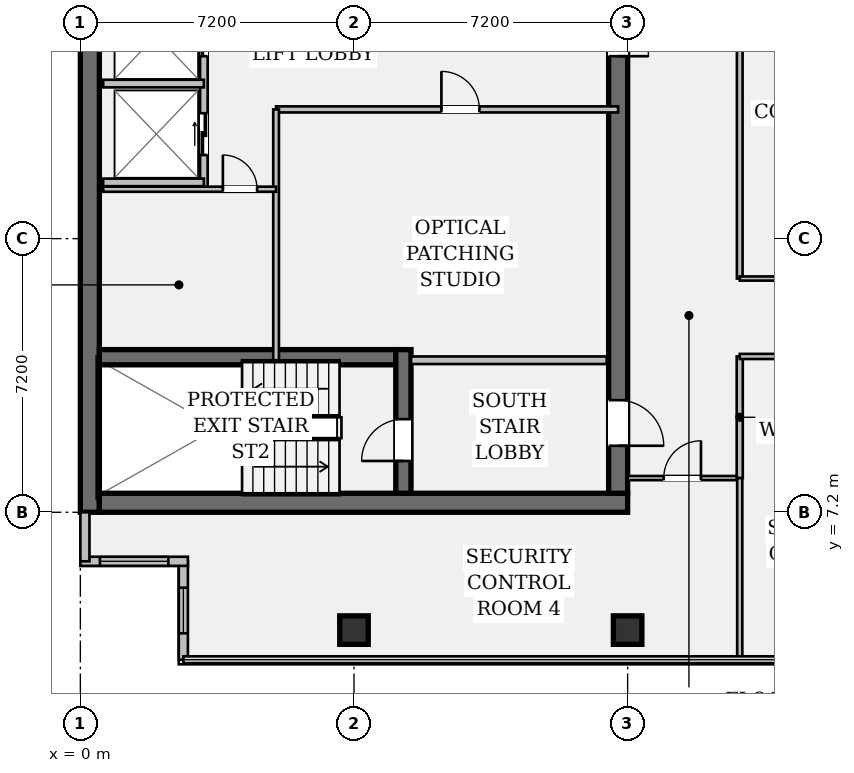
"""IFC4 building model, lengths in metres.
Left out: names, types, materials, properties, quantities, classifications, styles, units other than length and angle.
Written with IfcOpenShell. Run it as: python <this file> out.ifc"""

import sys

from ifc_helpers import new_model, si_unit, direction, frame, frame_2d, origin, origin_2d, place, context, subcontext, project, spatial, rectangle, hollow_rectangle, extrude, element, fill, save


model = new_model("IFC4")
c1 = context("Model", 3, precision=1e-05, world=origin(), true_north=direction((0.0, 1.0)))
c2 = subcontext(c1, "Body", "Model", "MODEL_VIEW")
j1 = project(units=[si_unit("LENGTHUNIT", "METRE"), si_unit("PLANEANGLEUNIT", "RADIAN")], contexts=[c1])
p1 = place(None, origin())
s1 = spatial("IfcSite", under=j1, at=p1, CompositionType="ELEMENT")
p2 = place(p1, origin())
s2 = spatial("IfcBuilding", under=s1, at=p2, CompositionType="ELEMENT")
p3 = place(p2, frame((0.0, 0.0, 204.75)))
s3 = spatial("IfcBuildingStorey", under=s2, at=p3, CompositionType="ELEMENT", Elevation=204.75)
p4 = place(p3, frame((0.25, 7.2, 0.0), z_axis=(0.0, 0.0, 1.0), x_axis=(0.0, 1.0, 0.0)))
e1 = element("IfcWall", 1, at=p4, inside=s3, PredefinedType="SHEAR", context=c2, shape_type="SweptSolid", body=[
    extrude(rectangle(XDim=28.8, YDim=0.5, at=frame_2d((14.4, 0.0))), origin(), (0.0, 0.0, 1.0), 3.24),
])
p5 = place(p3, frame((0.5, 7.45, 0.0), z_axis=(0.0, 0.0, 1.0), x_axis=(1.0, 0.0, 0.0)))
e2 = element("IfcWall", 2, at=p5, inside=s3, PredefinedType="SHEAR", context=c2, shape_type="SweptSolid", body=[
    extrude(rectangle(XDim=13.9, YDim=0.5, at=frame_2d((6.95, 0.0))), origin(), (0.0, 0.0, 1.0), 3.24),
])
p6 = place(p3, frame((14.15, 35.5, 0.0), z_axis=(0.0, 0.0, 1.0), x_axis=(0.0, -1.0, 0.0)))
e3 = element("IfcWall", 3, at=p6, inside=s3, PredefinedType="SHEAR", context=c2, shape_type="SweptSolid", body=[
    extrude(rectangle(XDim=27.8, YDim=0.5, at=frame_2d((13.9, 0.0))), origin(), (0.0, 0.0, 1.0), 3.24),
])
p7 = place(p6, frame((1.4, 0.0, 0.0)))
e4 = element("IfcOpeningElement", 4, at=p7, cuts=e3, PredefinedType="OPENING", context=c2, shape_type="SweptSolid", body=[
    extrude(rectangle(XDim=1.2, YDim=2.15, at=frame_2d((0.6, 1.075))), frame((0.0, 0.262, 0.0), z_axis=(0.0, -1.0, 0.0), x_axis=(1.0, 0.0, 0.0)), (0.0, 0.0, 1.0), 0.524),
])
p8 = place(p6, frame((25.35, 0.0, 0.0)))
e5 = element("IfcOpeningElement", 5, at=p8, cuts=e3, PredefinedType="OPENING", context=c2, shape_type="SweptSolid", body=[
    extrude(rectangle(XDim=1.2, YDim=2.15, at=frame_2d((0.6, 1.075))), frame((0.0, 0.262, 0.0), z_axis=(0.0, -1.0, 0.0), x_axis=(1.0, 0.0, 0.0)), (0.0, 0.0, 1.0), 0.524),
])
p9 = place(p6, frame((14.7, 0.0, 0.0)))
e6 = element("IfcOpeningElement", 6, at=p9, cuts=e3, PredefinedType="OPENING", context=c2, shape_type="SweptSolid", body=[
    extrude(rectangle(XDim=1.6, YDim=2.2, at=frame_2d((0.8, 1.1))), frame((0.0, 0.262, 0.0), z_axis=(0.0, -1.0, 0.0), x_axis=(1.0, 0.0, 0.0)), (0.0, 0.0, 1.0), 0.524),
])
p10 = place(p3, frame((0.5, 11.28, 0.0), z_axis=(0.0, 0.0, 1.0), x_axis=(1.0, 0.0, 0.0)))
e7 = element("IfcWall", 7, at=p10, inside=s3, PredefinedType="SHEAR", context=c2, shape_type="SweptSolid", body=[
    extrude(rectangle(XDim=7.8, YDim=0.4, at=frame_2d((3.9, 0.0))), origin(), (0.0, 0.0, 1.0), 3.24),
])
p11 = place(p3, frame((8.5, 7.7, 0.0), z_axis=(0.0, 0.0, 1.0), x_axis=(0.0, 1.0, 0.0)))
e8 = element("IfcWall", 8, at=p11, inside=s3, PredefinedType="SHEAR", context=c2, shape_type="SweptSolid", body=[
    extrude(rectangle(XDim=3.78, YDim=0.4, at=frame_2d((1.89, 0.0))), origin(), (0.0, 0.0, 1.0), 3.24),
])
p12 = place(p11, frame((0.85, 0.0, 0.0)))
e9 = element("IfcOpeningElement", 9, at=p12, cuts=e8, PredefinedType="OPENING", context=c2, shape_type="SweptSolid", body=[
    extrude(rectangle(XDim=1.1, YDim=2.15, at=frame_2d((0.55, 1.075))), frame((0.0, 0.212, 0.0), z_axis=(0.0, -1.0, 0.0), x_axis=(1.0, 0.0, 0.0)), (0.0, 0.0, 1.0), 0.424),
])
for number, where, z_axis, x_axis in (
    (10, (7.2, 4.1, 0.0), (0.0, 0.0, 1.0), (1.0, 0.0, 0.0)),
    (11, (14.4, 4.1, 0.0), (0.0, 0.0, 1.0), (1.0, 0.0, 0.0)),
):
    element("IfcColumn", number, at=place(p3, frame(where, z_axis=z_axis, x_axis=x_axis)), inside=s3, PredefinedType="COLUMN", context=c2, shape_type="SweptSolid", body=[
        extrude(hollow_rectangle(XDim=0.75, YDim=0.75, WallThickness=0.045, at=origin_2d()), origin(), (0.0, 0.0, 1.0), 3.24),
    ])
p13 = place(p3, frame((2.71, 3.32, 0.0), z_axis=(0.0, 0.0, 1.0), x_axis=(0.0, 1.0, 0.0)))
e12 = element("IfcWall", 12, at=p13, inside=s3, PredefinedType="STANDARD", context=c2, shape_type="SweptSolid", body=[
    extrude(rectangle(XDim=2.59, YDim=0.24, at=frame_2d((1.295, 0.0))), origin(), (0.0, 0.0, 1.0), 3.24),
])
p14 = place(p13, frame((0.695, 0.0, 0.95)))
e13 = element("IfcOpeningElement", 13, at=p14, cuts=e12, PredefinedType="OPENING", context=c2, shape_type="SweptSolid", body=[
    extrude(rectangle(XDim=1.2, YDim=1.8, at=frame_2d((0.6, 0.9))), frame((0.0, 0.132, 0.0), z_axis=(0.0, -1.0, 0.0), x_axis=(1.0, 0.0, 0.0)), (0.0, 0.0, 1.0), 0.264),
])
p15 = place(p3, frame((2.83, 5.91, 0.0), z_axis=(0.0, 0.0, 1.0), x_axis=(-1.0, 0.0, 0.0)))
e14 = element("IfcWall", 14, at=p15, inside=s3, PredefinedType="STANDARD", context=c2, shape_type="SweptSolid", body=[
    extrude(rectangle(XDim=2.83, YDim=0.24, at=frame_2d((1.415, 0.0))), origin(), (0.0, 0.0, 1.0), 3.24),
])
p16 = place(p15, frame((0.515, 0.0, 0.95)))
e15 = element("IfcOpeningElement", 15, at=p16, cuts=e14, PredefinedType="OPENING", context=c2, shape_type="SweptSolid", body=[
    extrude(rectangle(XDim=1.8, YDim=1.35, at=frame_2d((0.9, 0.675))), frame((0.0, 0.132, 0.0), z_axis=(0.0, -1.0, 0.0), x_axis=(1.0, 0.0, 0.0)), (0.0, 0.0, 1.0), 0.264),
])
p17 = place(p3, frame((0.12, 5.91, 0.0), z_axis=(0.0, 0.0, 1.0), x_axis=(0.0, 1.0, 0.0)))
e16 = element("IfcWall", 16, at=p17, inside=s3, PredefinedType="STANDARD", context=c2, shape_type="SweptSolid", body=[
    extrude(rectangle(XDim=1.29, YDim=0.24, at=frame_2d((0.645, 0.0))), origin(), (0.0, 0.0, 1.0), 3.24),
])
p18 = place(p3, frame((8.7, 11.2, 0.0), z_axis=(0.0, 0.0, 1.0), x_axis=(1.0, 0.0, 0.0)))
e17 = element("IfcWall", 17, at=p18, inside=s3, PredefinedType="PARTITIONING", context=c2, shape_type="SweptSolid", body=[
    extrude(rectangle(XDim=5.15, YDim=0.2, at=frame_2d((2.575, 0.0))), origin(), (0.0, 0.0, 1.0), 3.24),
])
p19 = place(p3, frame((3.25, 15.7, 0.0), z_axis=(0.0, 0.0, 1.0), x_axis=(0.0, 1.0, 0.0)))
e18 = element("IfcWall", 18, at=p19, inside=s3, PredefinedType="PARTITIONING", context=c2, shape_type="SweptSolid", body=[
    extrude(rectangle(XDim=13.08, YDim=0.2, at=frame_2d((6.54, 0.0))), origin(), (0.0, 0.0, 1.0), 3.24),
])
p20 = place(p19, frame((0.9, 0.0, 0.0)))
e19 = element("IfcOpeningElement", 19, at=p20, cuts=e18, PredefinedType="OPENING", context=c2, shape_type="SweptSolid", body=[
    extrude(rectangle(XDim=1.1, YDim=2.2, at=frame_2d((0.55, 1.1))), frame((0.0, 0.112, 0.0), z_axis=(0.0, -1.0, 0.0), x_axis=(1.0, 0.0, 0.0)), (0.0, 0.0, 1.0), 0.224),
])
p21 = place(p19, frame((3.5, 0.0, 0.0)))
e20 = element("IfcOpeningElement", 20, at=p21, cuts=e18, PredefinedType="OPENING", context=c2, shape_type="SweptSolid", body=[
    extrude(rectangle(XDim=1.1, YDim=2.2, at=frame_2d((0.55, 1.1))), frame((0.0, 0.112, 0.0), z_axis=(0.0, -1.0, 0.0), x_axis=(1.0, 0.0, 0.0)), (0.0, 0.0, 1.0), 0.224),
])
p22 = place(p19, frame((7.2, 0.0, 0.0)))
e21 = element("IfcOpeningElement", 21, at=p22, cuts=e18, PredefinedType="OPENING", context=c2, shape_type="SweptSolid", body=[
    extrude(rectangle(XDim=1.1, YDim=2.2, at=frame_2d((0.55, 1.1))), frame((0.0, 0.112, 0.0), z_axis=(0.0, -1.0, 0.0), x_axis=(1.0, 0.0, 0.0)), (0.0, 0.0, 1.0), 0.224),
])
p23 = place(p19, frame((9.8, 0.0, 0.0)))
e22 = element("IfcOpeningElement", 22, at=p23, cuts=e18, PredefinedType="OPENING", context=c2, shape_type="SweptSolid", body=[
    extrude(rectangle(XDim=1.1, YDim=2.2, at=frame_2d((0.55, 1.1))), frame((0.0, 0.112, 0.0), z_axis=(0.0, -1.0, 0.0), x_axis=(1.0, 0.0, 0.0)), (0.0, 0.0, 1.0), 0.224),
])
for number, where, z_axis, x_axis in (
    (23, (0.6, 15.88, 0.0), (0.0, 0.0, 1.0), (1.0, 0.0, 0.0)),
    (24, (0.6, 18.48, 0.0), (0.0, 0.0, 1.0), (1.0, 0.0, 0.0)),
):
    element("IfcWall", number, at=place(p3, frame(where, z_axis=z_axis, x_axis=x_axis)), inside=s3, PredefinedType="PARTITIONING", context=c2, shape_type="SweptSolid", body=[
        extrude(rectangle(XDim=2.65, YDim=0.2, at=frame_2d((1.325, 0.0))), origin(), (0.0, 0.0, 1.0), 3.24),
    ])
p24 = place(p3, frame((5.15, 17.8, 0.0), z_axis=(0.0, 0.0, 1.0), x_axis=(1.0, 0.0, 0.0)))
e25 = element("IfcWall", 25, at=p24, inside=s3, PredefinedType="PARTITIONING", context=c2, shape_type="SweptSolid", body=[
    extrude(rectangle(XDim=9.0, YDim=0.16, at=frame_2d((4.5, 0.0))), origin(), (0.0, 0.0, 1.0), 3.24),
])
p25 = place(p24, frame((4.35, 0.0, 0.0)))
e26 = element("IfcOpeningElement", 26, at=p25, cuts=e25, PredefinedType="OPENING", context=c2, shape_type="SweptSolid", body=[
    extrude(rectangle(XDim=1.0, YDim=2.15, at=frame_2d((0.5, 1.075))), frame((0.0, 0.092, 0.0), z_axis=(0.0, -1.0, 0.0), x_axis=(1.0, 0.0, 0.0)), (0.0, 0.0, 1.0), 0.184),
])
p26 = place(p3, frame((5.15, 11.2, 0.0), z_axis=(0.0, 0.0, 1.0), x_axis=(0.0, 1.0, 0.0)))
e27 = element("IfcWall", 27, at=p26, inside=s3, PredefinedType="PARTITIONING", context=c2, shape_type="SweptSolid", body=[
    extrude(rectangle(XDim=6.6, YDim=0.15, at=frame_2d((3.3, 0.0))), origin(), (0.0, 0.0, 1.0), 3.24),
])
p27 = place(p3, frame((0.6, 15.7, 0.0), z_axis=(0.0, 0.0, 1.0), x_axis=(1.0, 0.0, 0.0)))
e28 = element("IfcWall", 28, at=p27, inside=s3, PredefinedType="PARTITIONING", context=c2, shape_type="SweptSolid", body=[
    extrude(rectangle(XDim=4.55, YDim=0.135, at=frame_2d((2.275, 0.0))), origin(), (0.0, 0.0, 1.0), 3.24),
])
p28 = place(p27, frame((3.15, 0.0, 0.0)))
e29 = element("IfcOpeningElement", 29, at=p28, cuts=e28, PredefinedType="OPENING", context=c2, shape_type="SweptSolid", body=[
    extrude(rectangle(XDim=0.9, YDim=2.15, at=frame_2d((0.45, 1.075))), frame((0.0, 0.08, 0.0), z_axis=(0.0, -1.0, 0.0), x_axis=(1.0, 0.0, 0.0)), (0.0, 0.0, 1.0), 0.159),
])
p29 = place(p3, frame((14.4, 8.1, 0.0), z_axis=(0.0, 0.0, 1.0), x_axis=(1.0, 0.0, 0.0)))
e30 = element("IfcWall", 30, at=p29, inside=s3, PredefinedType="PARTITIONING", context=c2, shape_type="SweptSolid", body=[
    extrude(rectangle(XDim=2.95, YDim=0.11, at=frame_2d((1.475, 0.0))), origin(), (0.0, 0.0, 1.0), 2.808),
])
p30 = place(p29, frame((0.95, 0.0, 0.0)))
e31 = element("IfcOpeningElement", 31, at=p30, cuts=e30, PredefinedType="OPENING", context=c2, shape_type="SweptSolid", body=[
    extrude(rectangle(XDim=0.98, YDim=2.15, at=frame_2d((0.49, 1.075))), frame((0.0, 0.067, 0.0), z_axis=(0.0, -1.0, 0.0), x_axis=(1.0, 0.0, 0.0)), (0.0, 0.0, 1.0), 0.134),
])
p31 = place(p3, frame((17.35, 8.1, 0.0), z_axis=(0.0, 0.0, 1.0), x_axis=(0.0, 1.0, 0.0)))
e32 = element("IfcWall", 32, at=p31, inside=s3, PredefinedType="PARTITIONING", context=c2, shape_type="SweptSolid", body=[
    extrude(rectangle(XDim=3.2, YDim=0.16, at=frame_2d((1.6, 0.0))), origin(), (0.0, 0.0, 1.0), 3.24),
])
p32 = place(p3, frame((17.35, 13.35, 0.0), z_axis=(0.0, 0.0, 1.0), x_axis=(0.0, 1.0, 0.0)))
e33 = element("IfcWall", 33, at=p32, inside=s3, PredefinedType="PARTITIONING", context=c2, shape_type="SweptSolid", body=[
    extrude(rectangle(XDim=22.55, YDim=0.15, at=frame_2d((11.275, 0.0))), origin(), (0.0, 0.0, 1.0), 2.613),
])
p33 = place(p32, frame((13.08, 0.0, 0.0)))
e34 = element("IfcOpeningElement", 34, at=p33, cuts=e33, PredefinedType="OPENING", context=c2, shape_type="SweptSolid", body=[
    extrude(rectangle(XDim=0.9, YDim=2.15, at=frame_2d((0.45, 1.075))), frame((0.0, 0.087, 0.0), z_axis=(0.0, -1.0, 0.0), x_axis=(1.0, 0.0, 0.0)), (0.0, 0.0, 1.0), 0.174),
])
p34 = place(p32, frame((15.63, 0.0, 0.0)))
e35 = element("IfcOpeningElement", 35, at=p34, cuts=e33, PredefinedType="OPENING", context=c2, shape_type="SweptSolid", body=[
    extrude(rectangle(XDim=0.9, YDim=2.15, at=frame_2d((0.45, 1.075))), frame((0.0, 0.087, 0.0), z_axis=(0.0, -1.0, 0.0), x_axis=(1.0, 0.0, 0.0)), (0.0, 0.0, 1.0), 0.174),
])
p35 = place(p32, frame((18.18, 0.0, 0.0)))
e36 = element("IfcOpeningElement", 36, at=p35, cuts=e33, PredefinedType="OPENING", context=c2, shape_type="SweptSolid", body=[
    extrude(rectangle(XDim=0.9, YDim=2.15, at=frame_2d((0.45, 1.075))), frame((0.0, 0.087, 0.0), z_axis=(0.0, -1.0, 0.0), x_axis=(1.0, 0.0, 0.0)), (0.0, 0.0, 1.0), 0.174),
])
p36 = place(p32, frame((20.72, 0.0, 0.0)))
e37 = element("IfcOpeningElement", 37, at=p36, cuts=e33, PredefinedType="OPENING", context=c2, shape_type="SweptSolid", body=[
    extrude(rectangle(XDim=0.9, YDim=2.15, at=frame_2d((0.45, 1.075))), frame((0.0, 0.087, 0.0), z_axis=(0.0, -1.0, 0.0), x_axis=(1.0, 0.0, 0.0)), (0.0, 0.0, 1.0), 0.174),
])
p37 = place(p3, frame((17.35, 11.3, 0.0), z_axis=(0.0, 0.0, 1.0), x_axis=(1.0, 0.0, 0.0)))
e38 = element("IfcWall", 38, at=p37, inside=s3, PredefinedType="PARTITIONING", context=c2, shape_type="SweptSolid", body=[
    extrude(rectangle(XDim=6.0, YDim=0.135, at=frame_2d((3.0, 0.0))), origin(), (0.0, 0.0, 1.0), 2.613),
])
p38 = place(p37, frame((2.5, 0.0, 0.0)))
e39 = element("IfcOpeningElement", 39, at=p38, cuts=e38, PredefinedType="OPENING", context=c2, shape_type="SweptSolid", body=[
    extrude(rectangle(XDim=0.98, YDim=2.15, at=frame_2d((0.49, 1.075))), frame((0.0, 0.08, 0.0), z_axis=(0.0, -1.0, 0.0), x_axis=(1.0, 0.0, 0.0)), (0.0, 0.0, 1.0), 0.159),
])
p39 = place(p3, frame((17.35, 13.35, 0.0), z_axis=(0.0, 0.0, 1.0), x_axis=(1.0, 0.0, 0.0)))
e40 = element("IfcWall", 40, at=p39, inside=s3, PredefinedType="PARTITIONING", context=c2, shape_type="SweptSolid", body=[
    extrude(rectangle(XDim=6.0, YDim=0.11, at=frame_2d((3.0, 0.0))), origin(), (0.0, 0.0, 1.0), 2.613),
])
p40 = place(p39, frame((2.18, 0.0, 0.0)))
e41 = element("IfcOpeningElement", 41, at=p40, cuts=e40, PredefinedType="OPENING", context=c2, shape_type="SweptSolid", body=[
    extrude(rectangle(XDim=0.98, YDim=2.15, at=frame_2d((0.49, 1.075))), frame((0.0, 0.067, 0.0), z_axis=(0.0, -1.0, 0.0), x_axis=(1.0, 0.0, 0.0)), (0.0, 0.0, 1.0), 0.134),
])
p41 = place(p3, frame((17.35, 3.32, 0.0), z_axis=(0.0, 0.0, 1.0), x_axis=(0.0, 1.0, 0.0)))
e42 = element("IfcWall", 42, at=p41, inside=s3, PredefinedType="PARTITIONING", context=c2, shape_type="SweptSolid", body=[
    extrude(rectangle(XDim=4.78, YDim=0.135, at=frame_2d((2.39, 0.0))), origin(), (0.0, 0.0, 1.0), 2.613),
])
p42 = place(p14, origin())
e43 = element("IfcWindow", 43, at=p42, inside=s3, PartitioningType="SINGLE_PANEL", PredefinedType="WINDOW", context=c2, shape_type="SweptSolid", body=[
    extrude(rectangle(XDim=1.2, YDim=1.8, at=frame_2d((0.6, 0.9))), frame((0.0, 0.03, 0.0), z_axis=(0.0, -1.0, 0.0), x_axis=(1.0, 0.0, 0.0)), (0.0, 0.0, 1.0), 0.06),
])
fill(e13, e43)
p43 = place(p16, origin())
e44 = element("IfcWindow", 44, at=p43, inside=s3, PartitioningType="SINGLE_PANEL", PredefinedType="WINDOW", context=c2, shape_type="SweptSolid", body=[
    extrude(rectangle(XDim=1.8, YDim=1.35, at=frame_2d((0.9, 0.675))), frame((0.0, 0.03, 0.0), z_axis=(0.0, -1.0, 0.0), x_axis=(1.0, 0.0, 0.0)), (0.0, 0.0, 1.0), 0.06),
])
fill(e15, e44)
p44 = place(p12, origin())
e45 = element("IfcDoor", 45, at=p44, inside=s3, OperationType="SINGLE_SWING_LEFT", PredefinedType="DOOR", context=c2, shape_type="SweptSolid", body=[
    extrude(rectangle(XDim=1.1, YDim=2.15, at=frame_2d((0.55, 1.075))), frame((0.0, 0.025, 0.0), z_axis=(0.0, -1.0, 0.0), x_axis=(1.0, 0.0, 0.0)), (0.0, 0.0, 1.0), 0.05),
])
fill(e9, e45)
p45 = place(p8, origin())
e46 = element("IfcDoor", 46, at=p45, inside=s3, OperationType="SINGLE_SWING_RIGHT", PredefinedType="DOOR", context=c2, shape_type="SweptSolid", body=[
    extrude(rectangle(XDim=1.2, YDim=2.15, at=frame_2d((0.6, 1.075))), frame((0.0, 0.025, 0.0), z_axis=(0.0, -1.0, 0.0), x_axis=(1.0, 0.0, 0.0)), (0.0, 0.0, 1.0), 0.05),
])
fill(e5, e46)
p46 = place(p9, origin())
e47 = element("IfcDoor", 47, at=p46, inside=s3, OperationType="DOUBLE_DOOR_SINGLE_SWING", PredefinedType="DOOR", context=c2, shape_type="SweptSolid", body=[
    extrude(rectangle(XDim=1.6, YDim=2.2, at=frame_2d((0.8, 1.1))), frame((0.0, 0.025, 0.0), z_axis=(0.0, -1.0, 0.0), x_axis=(1.0, 0.0, 0.0)), (0.0, 0.0, 1.0), 0.05),
])
fill(e6, e47)
p47 = place(p20, origin())
e48 = element("IfcDoor", 48, at=p47, inside=s3, OperationType="DOUBLE_DOOR_SLIDING", PredefinedType="DOOR", context=c2, shape_type="SweptSolid", body=[
    extrude(rectangle(XDim=1.1, YDim=2.2, at=frame_2d((0.55, 1.1))), frame((0.0, 0.025, 0.0), z_axis=(0.0, -1.0, 0.0), x_axis=(1.0, 0.0, 0.0)), (0.0, 0.0, 1.0), 0.05),
])
fill(e19, e48)
p48 = place(p21, origin())
e49 = element("IfcDoor", 49, at=p48, inside=s3, OperationType="DOUBLE_DOOR_SLIDING", PredefinedType="DOOR", context=c2, shape_type="SweptSolid", body=[
    extrude(rectangle(XDim=1.1, YDim=2.2, at=frame_2d((0.55, 1.1))), frame((0.0, 0.025, 0.0), z_axis=(0.0, -1.0, 0.0), x_axis=(1.0, 0.0, 0.0)), (0.0, 0.0, 1.0), 0.05),
])
fill(e20, e49)
p49 = place(p25, origin())
e50 = element("IfcDoor", 50, at=p49, inside=s3, OperationType="SINGLE_SWING_LEFT", PredefinedType="DOOR", context=c2, shape_type="SweptSolid", body=[
    extrude(rectangle(XDim=1.0, YDim=2.15, at=frame_2d((0.5, 1.075))), frame((0.0, 0.025, 0.0), z_axis=(0.0, -1.0, 0.0), x_axis=(1.0, 0.0, 0.0)), (0.0, 0.0, 1.0), 0.05),
])
fill(e26, e50)
p50 = place(p28, origin())
e51 = element("IfcDoor", 51, at=p50, inside=s3, OperationType="SINGLE_SWING_LEFT", PredefinedType="DOOR", context=c2, shape_type="SweptSolid", body=[
    extrude(rectangle(XDim=0.9, YDim=2.15, at=frame_2d((0.45, 1.075))), frame((0.0, 0.025, 0.0), z_axis=(0.0, -1.0, 0.0), x_axis=(1.0, 0.0, 0.0)), (0.0, 0.0, 1.0), 0.05),
])
fill(e29, e51)
p51 = place(p30, origin())
e52 = element("IfcDoor", 52, at=p51, inside=s3, OperationType="SINGLE_SWING_RIGHT", PredefinedType="DOOR", context=c2, shape_type="SweptSolid", body=[
    extrude(rectangle(XDim=0.98, YDim=2.15, at=frame_2d((0.49, 1.075))), frame((0.0, 0.025, 0.0), z_axis=(0.0, -1.0, 0.0), x_axis=(1.0, 0.0, 0.0)), (0.0, 0.0, 1.0), 0.05),
])
fill(e31, e52)
save(model, sys.argv[1])
